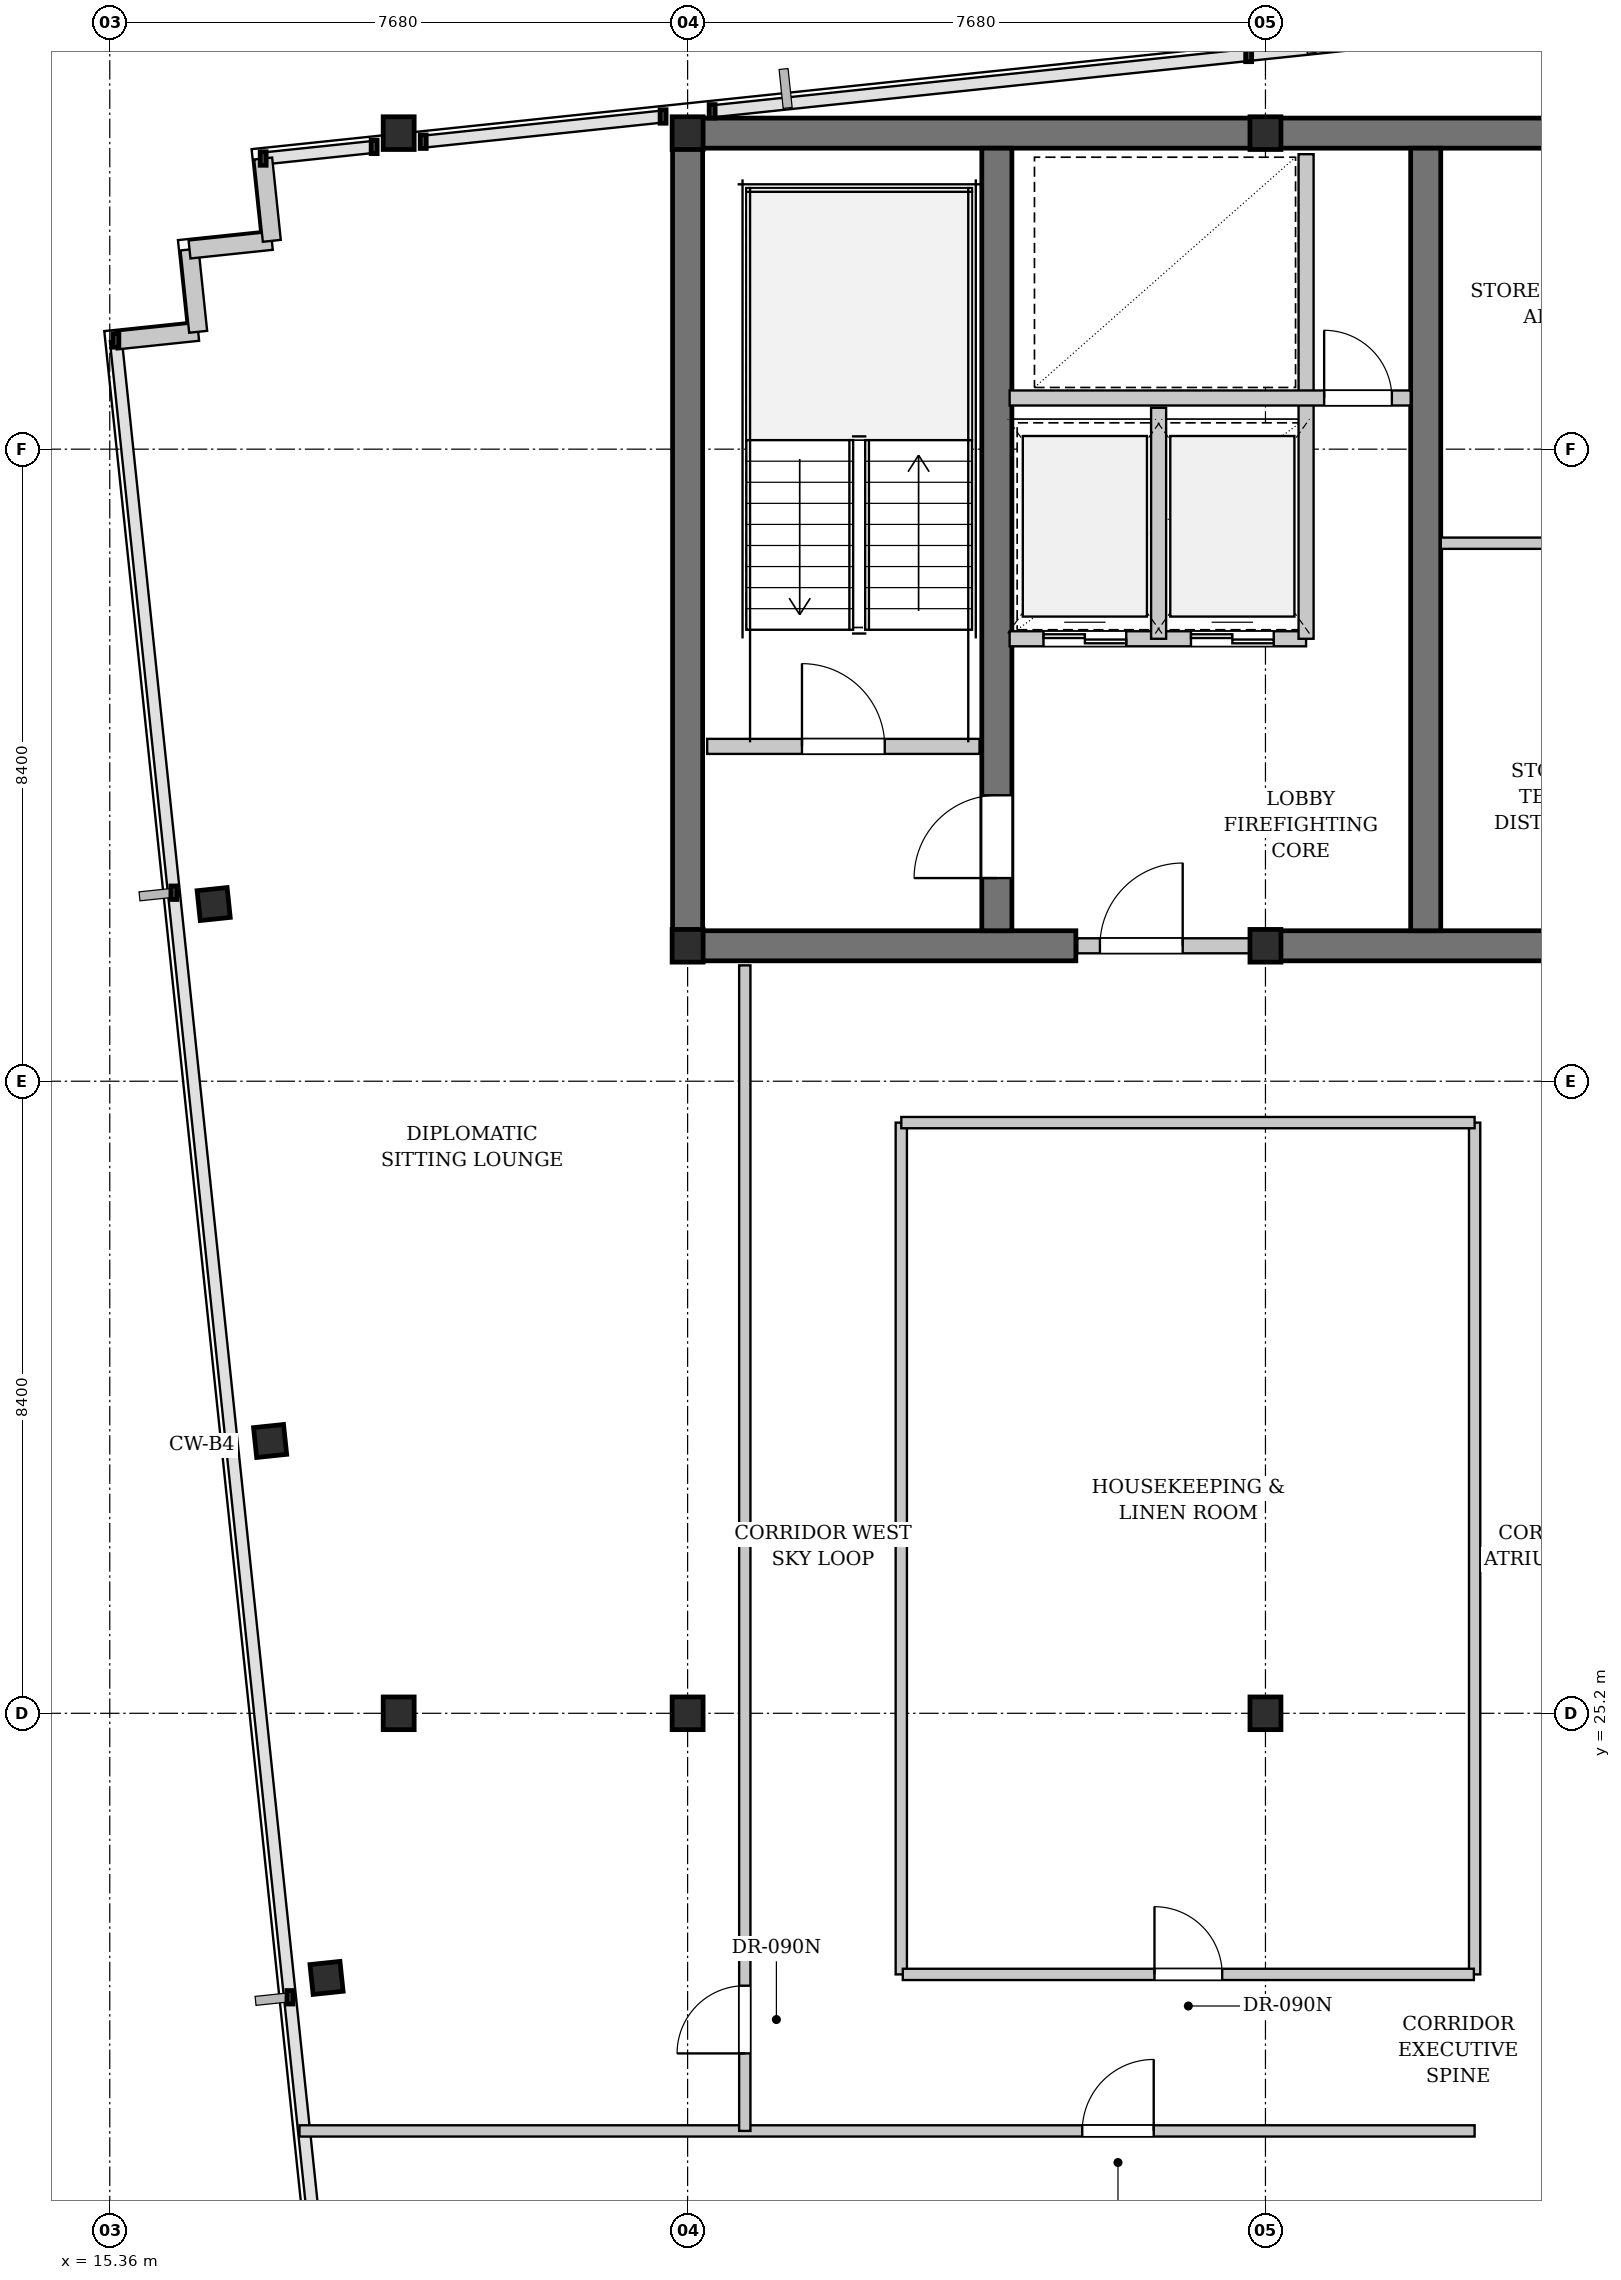
"""IFC4 building model, lengths in metres.
Left out: names, types, materials, properties, quantities, classifications, styles, units other than length and angle.
Written with IfcOpenShell. Run it as: python <this file> out.ifc"""

import sys

from ifc_helpers import new_model, si_unit, direction, frame, frame_2d, origin, origin_2d, place, context, subcontext, project, spatial, rectangle, i_section, extrude, element, fill, save


model = new_model("IFC4")
c1 = context("Model", 3, precision=1e-05, world=origin(), true_north=direction((0.0, 1.0)))
c2 = subcontext(c1, "Body", "Model", "MODEL_VIEW")
j1 = project(units=[si_unit("LENGTHUNIT", "METRE"), si_unit("PLANEANGLEUNIT", "RADIAN")], contexts=[c1])
p1 = place(None, origin())
s1 = spatial("IfcSite", under=j1, at=p1, CompositionType="ELEMENT")
p2 = place(p1, origin())
s2 = spatial("IfcBuilding", under=s1, at=p2, CompositionType="ELEMENT")
p3 = place(p2, frame((0.0, 0.0, 211.1)))
s3 = spatial("IfcBuildingStorey", under=s2, at=p3, CompositionType="ELEMENT", Elevation=211.1)
p4 = place(p3, frame((22.84, 46.2, 0.0), z_axis=(0.0, 0.0, 1.0), x_axis=(1.0, 0.0, 0.0)))
e1 = element("IfcWall", 1, at=p4, inside=s3, PredefinedType="SHEAR", context=c2, shape_type="SweptSolid", body=[
    extrude(rectangle(XDim=31.12, YDim=0.4, at=frame_2d((15.56, 0.0))), origin(), (0.0, 0.0, 1.0), 3.08),
])
p5 = place(p3, frame((22.84, 35.4, 0.0), z_axis=(0.0, 0.0, 1.0), x_axis=(1.0, 0.0, 0.0)))
e2 = element("IfcWall", 2, at=p5, inside=s3, PredefinedType="SHEAR", context=c2, shape_type="SweptSolid", body=[
    extrude(rectangle(XDim=5.36, YDim=0.4, at=frame_2d((2.68, 0.0))), origin(), (0.0, 0.0, 1.0), 3.08),
])
p6 = place(p3, frame((30.72, 35.4, 0.0), z_axis=(0.0, 0.0, 1.0), x_axis=(1.0, 0.0, 0.0)))
e3 = element("IfcWall", 3, at=p6, inside=s3, PredefinedType="SHEAR", context=c2, shape_type="SweptSolid", body=[
    extrude(rectangle(XDim=4.88, YDim=0.4, at=frame_2d((2.44, 0.0))), origin(), (0.0, 0.0, 1.0), 3.08),
])
p7 = place(p3, frame((23.04, 35.6, 0.0), z_axis=(0.0, 0.0, 1.0), x_axis=(0.0, 1.0, 0.0)))
e4 = element("IfcWall", 4, at=p7, inside=s3, PredefinedType="SHEAR", context=c2, shape_type="SweptSolid", body=[
    extrude(rectangle(XDim=10.4, YDim=0.4, at=frame_2d((5.2, 0.0))), origin(), (0.0, 0.0, 1.0), 3.08),
])
p8 = place(p3, frame((27.15, 35.6, 0.0), z_axis=(0.0, 0.0, 1.0), x_axis=(0.0, 1.0, 0.0)))
e5 = element("IfcWall", 5, at=p8, inside=s3, PredefinedType="SHEAR", context=c2, shape_type="SweptSolid", body=[
    extrude(rectangle(XDim=10.4, YDim=0.4, at=frame_2d((5.2, 0.0))), origin(), (0.0, 0.0, 1.0), 3.08),
])
p9 = place(p8, frame((0.7, 0.0, 0.0)))
e6 = element("IfcOpeningElement", 6, at=p9, cuts=e5, PredefinedType="OPENING", context=c2, shape_type="SweptSolid", body=[
    extrude(rectangle(XDim=1.1, YDim=2.15, at=frame_2d((0.55, 1.075))), frame((0.0, 0.21, 0.0), z_axis=(0.0, -1.0, 0.0), x_axis=(1.0, 0.0, 0.0)), (0.0, 0.0, 1.0), 0.42),
])
p10 = place(p3, frame((32.85, 35.6, 0.0), z_axis=(0.0, 0.0, 1.0), x_axis=(0.0, 1.0, 0.0)))
e7 = element("IfcWall", 7, at=p10, inside=s3, PredefinedType="SHEAR", context=c2, shape_type="SweptSolid", body=[
    extrude(rectangle(XDim=10.4, YDim=0.4, at=frame_2d((5.2, 0.0))), origin(), (0.0, 0.0, 1.0), 3.08),
])
for number, where, z_axis, x_axis in (
    (8, (23.04, 35.4, 0.0), (0.0, 0.0, 1.0), (1.0, 0.0, 0.0)),
    (9, (23.04, 46.2, 0.0), (0.0, 0.0, 1.0), (1.0, 0.0, 0.0)),
    (10, (23.04, 25.2, 0.0), (0.0, 0.0, 1.0), (1.0, 0.0, 0.0)),
    (11, (30.72, 35.4, 0.0), (0.0, 0.0, 1.0), (1.0, 0.0, 0.0)),
    (12, (30.72, 46.2, 0.0), (0.0, 0.0, 1.0), (1.0, 0.0, 0.0)),
    (13, (30.72, 25.2, 0.0), (0.0, 0.0, 1.0), (1.0, 0.0, 0.0)),
    (14, (19.2, 25.2, 0.0), (0.0, 0.0, 1.0), (1.0, 0.0, 0.0)),
    (15, (19.2, 46.2, 0.0), (0.0, 0.0, 1.0), (1.0, 0.0, 0.0)),
):
    element("IfcColumn", number, at=place(p3, frame(where, z_axis=z_axis, x_axis=x_axis)), inside=s3, PredefinedType="COLUMN", context=c2, shape_type="SweptSolid", body=[
        extrude(i_section(OverallWidth=0.412, OverallDepth=0.435, WebThickness=0.036, FlangeThickness=0.058, FilletRadius=0.015, at=origin_2d()), origin(), (0.0, 0.0, 1.0), 3.3),
    ])
for number, where, z_axis, x_axis in (
    (16, (18.241, 21.683, 0.0), (0.0, 0.0, 1.0), (0.995, 0.105, 0.0)),
    (17, (17.491, 28.819, 0.0), (0.0, 0.0, 1.0), (0.995, 0.105, 0.0)),
    (18, (16.741, 35.955, 0.0), (0.0, 0.0, 1.0), (0.995, 0.105, 0.0)),
):
    element("IfcColumn", number, at=place(p3, frame(where, z_axis=z_axis, x_axis=x_axis)), inside=s3, PredefinedType="COLUMN", context=c2, shape_type="SweptSolid", body=[
        extrude(i_section(OverallWidth=0.401, OverallDepth=0.399, WebThickness=0.025, FlangeThickness=0.04, FilletRadius=0.015, at=origin_2d()), origin(), (0.0, 0.0, 1.0), 3.3),
    ])
p11 = place(p3, frame((15.441, 43.445, 0.0), z_axis=(0.0, 0.0, 1.0), x_axis=(0.994495717747, 0.104777227405, 0.0)))
e19 = element("IfcWall", 19, at=p11, inside=s3, PredefinedType="SOLIDWALL", context=c2, shape_type="SweptSolid", body=[
    extrude(rectangle(XDim=1.1, YDim=0.24, at=frame_2d((0.55, 0.0))), origin(), (0.0, 0.0, 1.0), 3.08),
])
p12 = place(p3, frame((16.535, 43.56, 0.0), z_axis=(0.0, 0.0, 1.0), x_axis=(-0.104315068386, 0.994544300928, 0.0)))
e20 = element("IfcWall", 20, at=p12, inside=s3, PredefinedType="SOLIDWALL", context=c2, shape_type="SweptSolid", body=[
    extrude(rectangle(XDim=1.1, YDim=0.24, at=frame_2d((0.55, 0.0))), origin(), (0.0, 0.0, 1.0), 3.08),
])
p13 = place(p3, frame((16.42, 44.654, 0.0), z_axis=(0.0, 0.0, 1.0), x_axis=(0.994541884982, 0.104338099541, 0.0)))
e21 = element("IfcWall", 21, at=p13, inside=s3, PredefinedType="SOLIDWALL", context=c2, shape_type="SweptSolid", body=[
    extrude(rectangle(XDim=1.1, YDim=0.24, at=frame_2d((0.55, 0.0))), origin(), (0.0, 0.0, 1.0), 3.08),
])
p14 = place(p3, frame((17.514, 44.769, 0.0), z_axis=(0.0, 0.0, 1.0), x_axis=(-0.104534592565, 0.994521251134, 0.0)))
e22 = element("IfcWall", 22, at=p14, inside=s3, PredefinedType="SOLIDWALL", context=c2, shape_type="SweptSolid", body=[
    extrude(rectangle(XDim=1.1, YDim=0.24, at=frame_2d((0.55, 0.0))), origin(), (0.0, 0.0, 1.0), 3.08),
])
p15 = place(p3, frame((23.3, 38.05, 0.0), z_axis=(0.0, 0.0, 1.0), x_axis=(1.0, 0.0, 0.0)))
e23 = element("IfcWall", 23, at=p15, inside=s3, PredefinedType="PARTITIONING", context=c2, shape_type="SweptSolid", body=[
    extrude(rectangle(XDim=3.62, YDim=0.2, at=frame_2d((1.81, 0.0))), origin(), (0.0, 0.0, 1.0), 3.08),
])
p16 = place(p15, frame((1.26, 0.0, 0.0)))
e24 = element("IfcOpeningElement", 24, at=p16, cuts=e23, PredefinedType="OPENING", context=c2, shape_type="SweptSolid", body=[
    extrude(rectangle(XDim=1.1, YDim=2.15, at=frame_2d((0.55, 1.075))), frame((0.0, 0.11, 0.0), z_axis=(0.0, -1.0, 0.0), x_axis=(1.0, 0.0, 0.0)), (0.0, 0.0, 1.0), 0.22),
])
p17 = place(p3, frame((28.22, 35.4, 0.0), z_axis=(0.0, 0.0, 1.0), x_axis=(1.0, 0.0, 0.0)))
e25 = element("IfcWall", 25, at=p17, inside=s3, PredefinedType="PARTITIONING", context=c2, shape_type="SweptSolid", body=[
    extrude(rectangle(XDim=2.5, YDim=0.2, at=frame_2d((1.25, 0.0))), origin(), (0.0, 0.0, 1.0), 2.313),
])
p18 = place(p17, frame((0.3, 0.0, 0.0)))
e26 = element("IfcOpeningElement", 26, at=p18, cuts=e25, PredefinedType="OPENING", context=c2, shape_type="SweptSolid", body=[
    extrude(rectangle(XDim=1.1, YDim=2.15, at=frame_2d((0.55, 1.075))), frame((0.0, 0.11, 0.0), z_axis=(0.0, -1.0, 0.0), x_axis=(1.0, 0.0, 0.0)), (0.0, 0.0, 1.0), 0.22),
])
p19 = place(p3, frame((27.32, 39.48, 0.0), z_axis=(0.0, 0.0, 1.0), x_axis=(1.0, 0.0, 0.0)))
e27 = element("IfcWall", 27, at=p19, inside=s3, PredefinedType="PARTITIONING", context=c2, shape_type="SweptSolid", body=[
    extrude(rectangle(XDim=3.94, YDim=0.2, at=frame_2d((1.97, 0.0))), origin(), (0.0, 0.0, 1.0), 3.08),
])
p20 = place(p19, frame((0.45, 0.0, 0.0)))
e28 = element("IfcOpeningElement", 28, at=p20, cuts=e27, PredefinedType="OPENING", context=c2, shape_type="SweptSolid", body=[
    extrude(rectangle(XDim=1.1, YDim=2.2, at=frame_2d((0.55, 1.1))), frame((0.0, 0.11, 0.0), z_axis=(0.0, -1.0, 0.0), x_axis=(1.0, 0.0, 0.0)), (0.0, 0.0, 1.0), 0.22),
])
p21 = place(p19, frame((2.41, 0.0, 0.0)))
e29 = element("IfcOpeningElement", 29, at=p21, cuts=e27, PredefinedType="OPENING", context=c2, shape_type="SweptSolid", body=[
    extrude(rectangle(XDim=1.1, YDim=2.2, at=frame_2d((0.55, 1.1))), frame((0.0, 0.11, 0.0), z_axis=(0.0, -1.0, 0.0), x_axis=(1.0, 0.0, 0.0)), (0.0, 0.0, 1.0), 0.22),
])
p22 = place(p3, frame((29.3, 39.48, 0.0), z_axis=(0.0, 0.0, 1.0), x_axis=(0.0, 1.0, 0.0)))
e30 = element("IfcWall", 30, at=p22, inside=s3, PredefinedType="PARTITIONING", context=c2, shape_type="SweptSolid", body=[
    extrude(rectangle(XDim=3.07, YDim=0.2, at=frame_2d((1.535, 0.0))), origin(), (0.0, 0.0, 1.0), 3.08),
])
p23 = place(p3, frame((31.26, 39.48, 0.0), z_axis=(0.0, 0.0, 1.0), x_axis=(0.0, 1.0, 0.0)))
e31 = element("IfcWall", 31, at=p23, inside=s3, PredefinedType="PARTITIONING", context=c2, shape_type="SweptSolid", body=[
    extrude(rectangle(XDim=6.44, YDim=0.2, at=frame_2d((3.22, 0.0))), origin(), (0.0, 0.0, 1.0), 3.08),
])
p24 = place(p3, frame((27.32, 42.68, 0.0), z_axis=(0.0, 0.0, 1.0), x_axis=(1.0, 0.0, 0.0)))
e32 = element("IfcWall", 32, at=p24, inside=s3, PredefinedType="PARTITIONING", context=c2, shape_type="SweptSolid", body=[
    extrude(rectangle(XDim=5.33, YDim=0.2, at=frame_2d((2.665, 0.0))), origin(), (0.0, 0.0, 1.0), 3.08),
])
p25 = place(p24, frame((4.18, 0.0, 0.0)))
e33 = element("IfcOpeningElement", 33, at=p25, cuts=e32, PredefinedType="OPENING", context=c2, shape_type="SweptSolid", body=[
    extrude(rectangle(XDim=0.9, YDim=2.15, at=frame_2d((0.45, 1.075))), frame((0.0, 0.11, 0.0), z_axis=(0.0, -1.0, 0.0), x_axis=(1.0, 0.0, 0.0)), (0.0, 0.0, 1.0), 0.22),
])
p26 = place(p3, frame((33.05, 40.75, 0.0), z_axis=(0.0, 0.0, 1.0), x_axis=(1.0, 0.0, 0.0)))
e34 = element("IfcWall", 34, at=p26, inside=s3, PredefinedType="PARTITIONING", context=c2, shape_type="SweptSolid", body=[
    extrude(rectangle(XDim=3.57, YDim=0.15, at=frame_2d((1.785, 0.0))), origin(), (0.0, 0.0, 1.0), 3.08),
])
p27 = place(p3, frame((17.882, 19.65, 0.0), z_axis=(0.0, 0.0, 1.0), x_axis=(1.0, 0.0, 0.0)))
e35 = element("IfcWall", 35, at=p27, inside=s3, PredefinedType="PARTITIONING", context=c2, shape_type="SweptSolid", body=[
    extrude(rectangle(XDim=15.618, YDim=0.15, at=frame_2d((7.809, 0.0))), origin(), (0.0, 0.0, 1.0), 2.715),
])
p28 = place(p27, frame((10.403, 0.0, 0.0)))
e36 = element("IfcOpeningElement", 36, at=p28, cuts=e35, PredefinedType="OPENING", context=c2, shape_type="SweptSolid", body=[
    extrude(rectangle(XDim=0.95, YDim=2.15, at=frame_2d((0.475, 1.075))), frame((0.0, 0.085, 0.0), z_axis=(0.0, -1.0, 0.0), x_axis=(1.0, 0.0, 0.0)), (0.0, 0.0, 1.0), 0.17),
])
p29 = place(p3, frame((23.8, 19.65, 0.0), z_axis=(0.0, 0.0, 1.0), x_axis=(0.0, 1.0, 0.0)))
e37 = element("IfcWall", 37, at=p29, inside=s3, PredefinedType="PARTITIONING", context=c2, shape_type="SweptSolid", body=[
    extrude(rectangle(XDim=15.49, YDim=0.15, at=frame_2d((7.745, 0.0))), origin(), (0.0, 0.0, 1.0), 3.08),
])
p30 = place(p29, frame((1.03, 0.0, 0.0)))
e38 = element("IfcOpeningElement", 38, at=p30, cuts=e37, PredefinedType="OPENING", context=c2, shape_type="SweptSolid", body=[
    extrude(rectangle(XDim=0.9, YDim=2.15, at=frame_2d((0.45, 1.075))), frame((0.0, 0.085, 0.0), z_axis=(0.0, -1.0, 0.0), x_axis=(1.0, 0.0, 0.0)), (0.0, 0.0, 1.0), 0.17),
])
for number, where, z_axis, x_axis in (
    (39, (25.88, 21.73, 0.0), (0.0, 0.0, 1.0), (0.0, 1.0, 0.0)),
    (40, (33.5, 21.73, 0.0), (0.0, 0.0, 1.0), (0.0, 1.0, 0.0)),
):
    element("IfcWall", number, at=place(p3, frame(where, z_axis=z_axis, x_axis=x_axis)), inside=s3, PredefinedType="PARTITIONING", context=c2, shape_type="SweptSolid", body=[
        extrude(rectangle(XDim=11.32, YDim=0.15, at=frame_2d((5.66, 0.0))), origin(), (0.0, 0.0, 1.0), 3.08),
    ])
p31 = place(p3, frame((25.88, 33.05, 0.0), z_axis=(0.0, 0.0, 1.0), x_axis=(1.0, 0.0, 0.0)))
e41 = element("IfcWall", 41, at=p31, inside=s3, PredefinedType="PARTITIONING", context=c2, shape_type="SweptSolid", body=[
    extrude(rectangle(XDim=7.62, YDim=0.15, at=frame_2d((3.81, 0.0))), origin(), (0.0, 0.0, 1.0), 3.08),
])
p32 = place(p3, frame((25.9, 21.73, 0.0), z_axis=(0.0, 0.0, 1.0), x_axis=(1.0, 0.0, 0.0)))
e42 = element("IfcWall", 42, at=p32, inside=s3, PredefinedType="PARTITIONING", context=c2, shape_type="SweptSolid", body=[
    extrude(rectangle(XDim=7.59, YDim=0.15, at=frame_2d((3.795, 0.0))), origin(), (0.0, 0.0, 1.0), 3.08),
])
p33 = place(p32, frame((3.345, 0.0, 0.0)))
e43 = element("IfcOpeningElement", 43, at=p33, cuts=e42, PredefinedType="OPENING", context=c2, shape_type="SweptSolid", body=[
    extrude(rectangle(XDim=0.9, YDim=2.15, at=frame_2d((0.45, 1.075))), frame((0.0, 0.085, 0.0), z_axis=(0.0, -1.0, 0.0), x_axis=(1.0, 0.0, 0.0)), (0.0, 0.0, 1.0), 0.17),
])
p34 = place(p16, origin())
e44 = element("IfcDoor", 44, at=p34, inside=s3, OperationType="SINGLE_SWING_LEFT", PredefinedType="DOOR", context=c2, shape_type="SweptSolid", body=[
    extrude(rectangle(XDim=1.1, YDim=2.15, at=frame_2d((0.55, 1.075))), frame((0.0, 0.025, 0.0), z_axis=(0.0, -1.0, 0.0), x_axis=(1.0, 0.0, 0.0)), (0.0, 0.0, 1.0), 0.05),
])
fill(e24, e44)
p35 = place(p18, origin())
e45 = element("IfcDoor", 45, at=p35, inside=s3, OperationType="SINGLE_SWING_RIGHT", PredefinedType="DOOR", context=c2, shape_type="SweptSolid", body=[
    extrude(rectangle(XDim=1.1, YDim=2.15, at=frame_2d((0.55, 1.075))), frame((0.0, 0.025, 0.0), z_axis=(0.0, -1.0, 0.0), x_axis=(1.0, 0.0, 0.0)), (0.0, 0.0, 1.0), 0.05),
])
fill(e26, e45)
p36 = place(p20, origin())
e46 = element("IfcDoor", 46, at=p36, inside=s3, OperationType="DOUBLE_DOOR_SLIDING", PredefinedType="DOOR", context=c2, shape_type="SweptSolid", body=[
    extrude(rectangle(XDim=1.1, YDim=2.2, at=frame_2d((0.55, 1.1))), frame((0.0, 0.025, 0.0), z_axis=(0.0, -1.0, 0.0), x_axis=(1.0, 0.0, 0.0)), (0.0, 0.0, 1.0), 0.05),
])
fill(e28, e46)
p37 = place(p21, origin())
e47 = element("IfcDoor", 47, at=p37, inside=s3, OperationType="DOUBLE_DOOR_SLIDING", PredefinedType="DOOR", context=c2, shape_type="SweptSolid", body=[
    extrude(rectangle(XDim=1.1, YDim=2.2, at=frame_2d((0.55, 1.1))), frame((0.0, 0.025, 0.0), z_axis=(0.0, -1.0, 0.0), x_axis=(1.0, 0.0, 0.0)), (0.0, 0.0, 1.0), 0.05),
])
fill(e29, e47)
p38 = place(p25, origin())
e48 = element("IfcDoor", 48, at=p38, inside=s3, OperationType="SINGLE_SWING_LEFT", PredefinedType="DOOR", context=c2, shape_type="SweptSolid", body=[
    extrude(rectangle(XDim=0.9, YDim=2.15, at=frame_2d((0.45, 1.075))), frame((0.0, 0.025, 0.0), z_axis=(0.0, -1.0, 0.0), x_axis=(1.0, 0.0, 0.0)), (0.0, 0.0, 1.0), 0.05),
])
fill(e33, e48)
p39 = place(p28, origin())
e49 = element("IfcDoor", 49, at=p39, inside=s3, OperationType="SINGLE_SWING_RIGHT", PredefinedType="DOOR", context=c2, shape_type="SweptSolid", body=[
    extrude(rectangle(XDim=0.95, YDim=2.15, at=frame_2d((0.475, 1.075))), frame((0.0, 0.025, 0.0), z_axis=(0.0, -1.0, 0.0), x_axis=(1.0, 0.0, 0.0)), (0.0, 0.0, 1.0), 0.05),
])
fill(e36, e49)
p40 = place(p30, origin())
e50 = element("IfcDoor", 50, at=p40, inside=s3, OperationType="SINGLE_SWING_LEFT", PredefinedType="DOOR", context=c2, shape_type="SweptSolid", body=[
    extrude(rectangle(XDim=0.9, YDim=2.15, at=frame_2d((0.45, 1.075))), frame((0.0, 0.025, 0.0), z_axis=(0.0, -1.0, 0.0), x_axis=(1.0, 0.0, 0.0)), (0.0, 0.0, 1.0), 0.05),
])
fill(e38, e50)
p41 = place(p33, origin())
e51 = element("IfcDoor", 51, at=p41, inside=s3, OperationType="SINGLE_SWING_LEFT", PredefinedType="DOOR", context=c2, shape_type="SweptSolid", body=[
    extrude(rectangle(XDim=0.9, YDim=2.15, at=frame_2d((0.45, 1.075))), frame((0.0, 0.025, 0.0), z_axis=(0.0, -1.0, 0.0), x_axis=(1.0, 0.0, 0.0)), (0.0, 0.0, 1.0), 0.05),
])
fill(e43, e51)
p42 = place(p9, origin())
e52 = element("IfcDoor", 52, at=p42, inside=s3, OperationType="SINGLE_SWING_LEFT", PredefinedType="DOOR", context=c2, shape_type="SweptSolid", body=[
    extrude(rectangle(XDim=1.1, YDim=2.15, at=frame_2d((0.55, 1.075))), frame((0.0, 0.025, 0.0), z_axis=(0.0, -1.0, 0.0), x_axis=(1.0, 0.0, 0.0)), (0.0, 0.0, 1.0), 0.05),
])
fill(e6, e52)
save(model, sys.argv[1])
